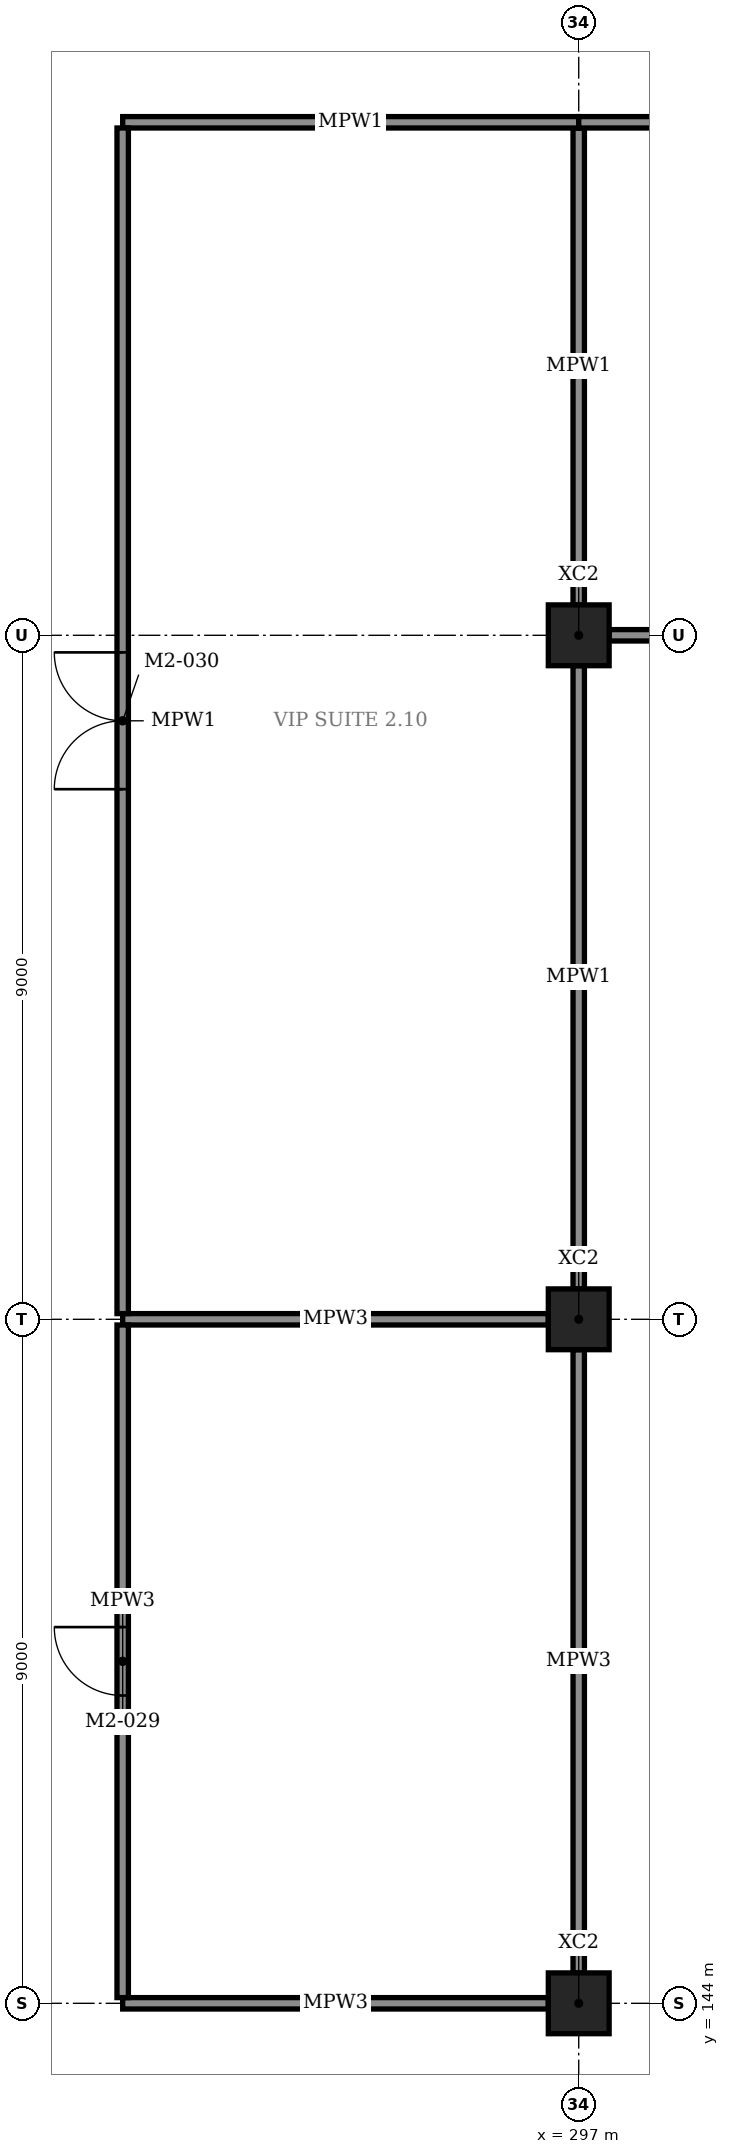
"""IFC4 building model, lengths in metres.
Left out: names, types, materials, properties, quantities, classifications, styles, units other than length and angle.
Written with IfcOpenShell. Run it as: python <this file> out.ifc"""

import sys

from ifc_helpers import new_model, si_unit, direction, frame, frame_2d, origin, origin_2d, place, context, subcontext, project, spatial, rectangle, extrude, element, fill, save


model = new_model("IFC4")
c1 = context("Model", 3, precision=1e-05, world=origin(), true_north=direction((0.0, 1.0)))
c2 = subcontext(c1, "Body", "Model", "MODEL_VIEW")
j1 = project(units=[si_unit("LENGTHUNIT", "METRE"), si_unit("PLANEANGLEUNIT", "RADIAN")], contexts=[c1])
p1 = place(None, origin())
s1 = spatial("IfcSite", under=j1, at=p1, CompositionType="ELEMENT")
p2 = place(p1, origin())
s2 = spatial("IfcBuilding", under=s1, at=p2, CompositionType="ELEMENT")
p3 = place(p2, frame((0.0, 0.0, 11.5)))
s3 = spatial("IfcBuildingStorey", under=s2, at=p3, CompositionType="ELEMENT", Elevation=11.5)
for number, where, z_axis, x_axis in (
    (1, (297.0, 144.0, 0.0), (0.0, 0.0, 1.0), (1.0, 0.0, 0.0)),
    (2, (297.0, 153.0, 0.0), (0.0, 0.0, 1.0), (1.0, 0.0, 0.0)),
    (3, (297.0, 162.0, 0.0), (0.0, 0.0, 1.0), (1.0, 0.0, 0.0)),
):
    element("IfcColumn", number, at=place(p3, frame(where, z_axis=z_axis, x_axis=x_axis)), inside=s3, PredefinedType="COLUMN", context=c2, shape_type="SweptSolid", body=[
        extrude(rectangle(XDim=0.8, YDim=0.8, at=origin_2d()), origin(), (0.0, 0.0, 1.0), 5.5),
    ])
for number, where, z_axis, x_axis in (
    (4, (291.0, 144.0, 0.0), (0.0, 0.0, 1.0), (1.0, 0.0, 0.0)),
    (5, (291.0, 153.0, 0.0), (0.0, 0.0, 1.0), (1.0, 0.0, 0.0)),
):
    element("IfcWall", number, at=place(p3, frame(where, z_axis=z_axis, x_axis=x_axis)), inside=s3, PredefinedType="PARTITIONING", context=c2, shape_type="SweptSolid", body=[
        extrude(rectangle(XDim=5.6, YDim=0.15, at=frame_2d((2.8, 0.0))), origin(), (0.0, 0.0, 1.0), 4.32),
    ])
p4 = place(p3, frame((291.0, 144.075, 0.0), z_axis=(0.0, 0.0, 1.0), x_axis=(0.0, 1.0, 0.0)))
e6 = element("IfcWall", 6, at=p4, inside=s3, PredefinedType="PARTITIONING", context=c2, shape_type="SweptSolid", body=[
    extrude(rectangle(XDim=8.85, YDim=0.15, at=frame_2d((4.425, 0.0))), origin(), (0.0, 0.0, 1.0), 4.32),
])
p5 = place(p4, frame((3.975, 0.0, 0.0)))
e7 = element("IfcOpeningElement", 7, at=p5, cuts=e6, PredefinedType="OPENING", context=c2, shape_type="SweptSolid", body=[
    extrude(rectangle(XDim=0.9, YDim=2.1, at=frame_2d((0.45, 1.05))), frame((0.0, 0.085, 0.0), z_axis=(0.0, -1.0, 0.0), x_axis=(1.0, 0.0, 0.0)), (0.0, 0.0, 1.0), 0.17),
])
p6 = place(p3, frame((297.0, 144.4, 0.0), z_axis=(0.0, 0.0, 1.0), x_axis=(0.0, 1.0, 0.0)))
e8 = element("IfcWall", 8, at=p6, inside=s3, PredefinedType="PARTITIONING", context=c2, shape_type="SweptSolid", body=[
    extrude(rectangle(XDim=8.2, YDim=0.15, at=frame_2d((4.1, 0.0))), origin(), (0.0, 0.0, 1.0), 4.32),
])
p7 = place(p3, frame((291.0, 168.75, 0.0), z_axis=(0.0, 0.0, 1.0), x_axis=(1.0, 0.0, 0.0)))
e9 = element("IfcWall", 9, at=p7, inside=s3, PredefinedType="PARTITIONING", context=c2, shape_type="SweptSolid", body=[
    extrude(rectangle(XDim=6.0, YDim=0.15, at=frame_2d((3.0, 0.0))), origin(), (0.0, 0.0, 1.0), 4.32),
])
p8 = place(p3, frame((291.0, 153.075, 0.0), z_axis=(0.0, 0.0, 1.0), x_axis=(0.0, 1.0, 0.0)))
e10 = element("IfcWall", 10, at=p8, inside=s3, PredefinedType="PARTITIONING", context=c2, shape_type="SweptSolid", body=[
    extrude(rectangle(XDim=15.6, YDim=0.15, at=frame_2d((7.8, 0.0))), origin(), (0.0, 0.0, 1.0), 4.32),
])
p9 = place(p8, frame((6.9, 0.0, 0.0)))
e11 = element("IfcOpeningElement", 11, at=p9, cuts=e10, PredefinedType="OPENING", context=c2, shape_type="SweptSolid", body=[
    extrude(rectangle(XDim=1.8, YDim=2.4, at=frame_2d((0.9, 1.2))), frame((0.0, 0.085, 0.0), z_axis=(0.0, -1.0, 0.0), x_axis=(1.0, 0.0, 0.0)), (0.0, 0.0, 1.0), 0.17),
])
p10 = place(p3, frame((297.0, 153.4, 0.0), z_axis=(0.0, 0.0, 1.0), x_axis=(0.0, 1.0, 0.0)))
e12 = element("IfcWall", 12, at=p10, inside=s3, PredefinedType="PARTITIONING", context=c2, shape_type="SweptSolid", body=[
    extrude(rectangle(XDim=8.2, YDim=0.15, at=frame_2d((4.1, 0.0))), origin(), (0.0, 0.0, 1.0), 4.32),
])
p11 = place(p3, frame((297.0, 162.4, 0.0), z_axis=(0.0, 0.0, 1.0), x_axis=(0.0, 1.0, 0.0)))
e13 = element("IfcWall", 13, at=p11, inside=s3, PredefinedType="PARTITIONING", context=c2, shape_type="SweptSolid", body=[
    extrude(rectangle(XDim=6.275, YDim=0.15, at=frame_2d((3.138, 0.0))), origin(), (0.0, 0.0, 1.0), 4.32),
])
p12 = place(p3, frame((297.4, 162.0, 0.0), z_axis=(0.0, 0.0, 1.0), x_axis=(1.0, 0.0, 0.0)))
e14 = element("IfcWall", 14, at=p12, inside=s3, PredefinedType="PARTITIONING", context=c2, shape_type="SweptSolid", body=[
    extrude(rectangle(XDim=8.2, YDim=0.15, at=frame_2d((4.1, 0.0))), origin(), (0.0, 0.0, 1.0), 4.32),
])
p13 = place(p3, frame((297.0, 168.75, 0.0), z_axis=(0.0, 0.0, 1.0), x_axis=(1.0, 0.0, 0.0)))
e15 = element("IfcWall", 15, at=p13, inside=s3, PredefinedType="PARTITIONING", context=c2, shape_type="SweptSolid", body=[
    extrude(rectangle(XDim=18.0, YDim=0.15, at=frame_2d((9.0, 0.0))), origin(), (0.0, 0.0, 1.0), 4.32),
])
p14 = place(p13, frame((8.1, 0.0, 0.0)))
e16 = element("IfcOpeningElement", 16, at=p14, cuts=e15, PredefinedType="OPENING", context=c2, shape_type="SweptSolid", body=[
    extrude(rectangle(XDim=1.8, YDim=2.4, at=frame_2d((0.9, 1.2))), frame((0.0, 0.085, 0.0), z_axis=(0.0, -1.0, 0.0), x_axis=(1.0, 0.0, 0.0)), (0.0, 0.0, 1.0), 0.17),
])
p15 = place(p5, origin())
e17 = element("IfcDoor", 17, at=p15, inside=s3, OperationType="SINGLE_SWING_RIGHT", PredefinedType="DOOR", context=c2, shape_type="SweptSolid", body=[
    extrude(rectangle(XDim=0.9, YDim=2.1, at=frame_2d((0.45, 1.05))), frame((0.0, 0.025, 0.0), z_axis=(0.0, -1.0, 0.0), x_axis=(1.0, 0.0, 0.0)), (0.0, 0.0, 1.0), 0.05),
])
fill(e7, e17)
p16 = place(p9, origin())
e18 = element("IfcDoor", 18, at=p16, inside=s3, OperationType="DOUBLE_DOOR_SINGLE_SWING", PredefinedType="DOOR", context=c2, shape_type="SweptSolid", body=[
    extrude(rectangle(XDim=1.8, YDim=2.4, at=frame_2d((0.9, 1.2))), frame((0.0, 0.025, 0.0), z_axis=(0.0, -1.0, 0.0), x_axis=(1.0, 0.0, 0.0)), (0.0, 0.0, 1.0), 0.05),
])
fill(e11, e18)
save(model, sys.argv[1])
